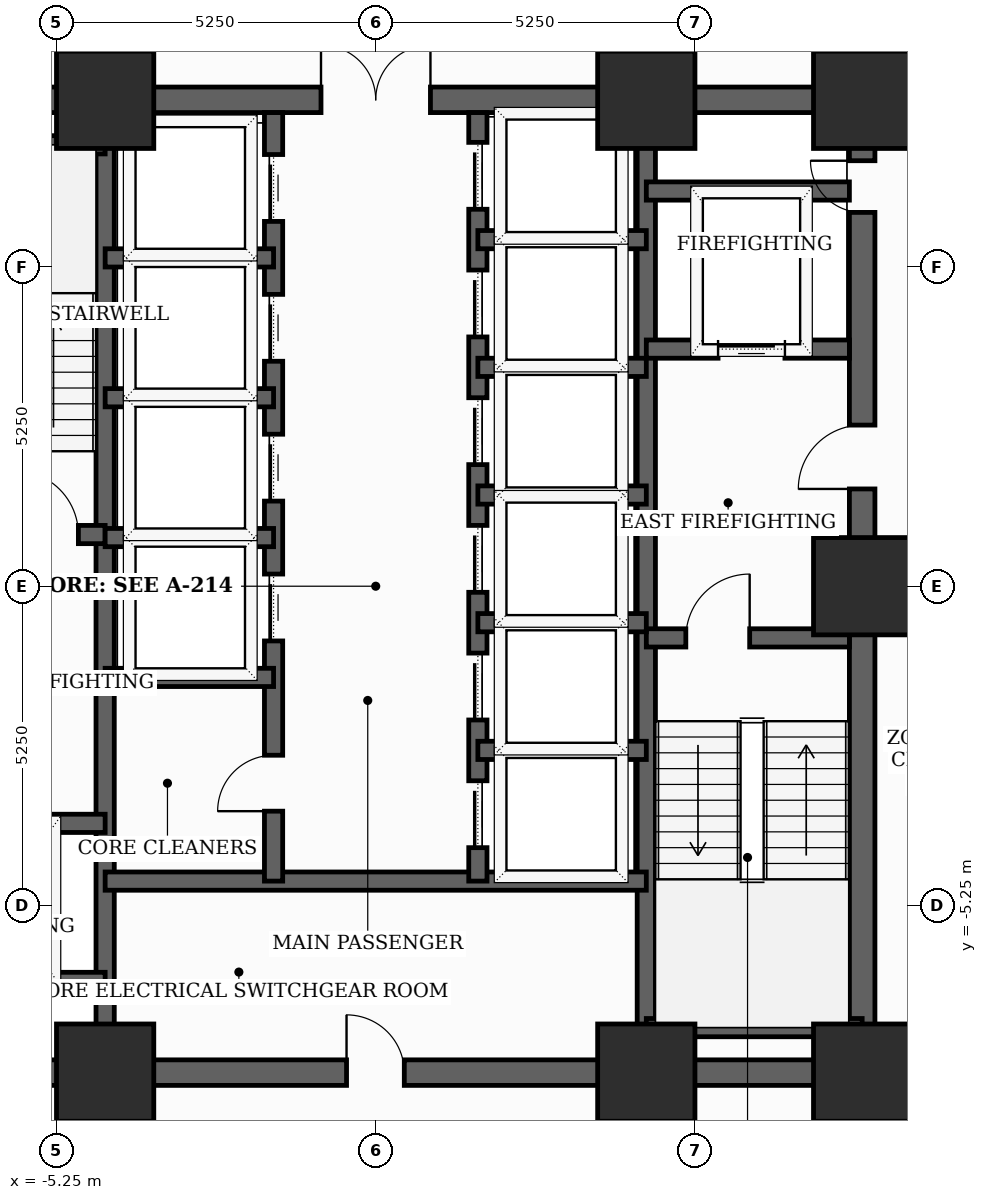
"""IFC4 building model, lengths in metres.
Left out: names, types, materials, properties, quantities, classifications, styles, units other than length and angle.
Written with IfcOpenShell. Run it as: python <this file> out.ifc"""

import sys

from ifc_helpers import new_model, si_unit, direction, frame, frame_2d, origin, origin_2d, place, context, subcontext, project, spatial, rectangle, extrude, element, fill, save


model = new_model("IFC4")
c1 = context("Model", 3, precision=1e-05, world=origin(), true_north=direction((0.0, 1.0)))
c2 = subcontext(c1, "Body", "Model", "MODEL_VIEW")
j1 = project(units=[si_unit("LENGTHUNIT", "METRE"), si_unit("PLANEANGLEUNIT", "RADIAN")], contexts=[c1])
p1 = place(None, origin())
s1 = spatial("IfcSite", under=j1, at=p1, CompositionType="ELEMENT")
p2 = place(p1, origin())
s2 = spatial("IfcBuilding", under=s1, at=p2, CompositionType="ELEMENT")
p3 = place(p2, frame((0.0, 0.0, 59.3)))
s3 = spatial("IfcBuildingStorey", under=s2, at=p3, CompositionType="ELEMENT", Elevation=59.3)
for number, where, z_axis, x_axis in (
    (1, (-4.45, -8.0, 0.0), (0.0, 0.0, 1.0), (1.0, 0.0, 0.0)),
    (2, (4.45, -8.0, 0.0), (0.0, 0.0, 1.0), (1.0, 0.0, 0.0)),
    (3, (8.0, -8.0, 0.0), (0.0, 0.0, 1.0), (1.0, 0.0, 0.0)),
    (4, (8.0, 0.0, 0.0), (0.0, 0.0, 1.0), (1.0, 0.0, 0.0)),
    (5, (8.0, 8.0, 0.0), (0.0, 0.0, 1.0), (1.0, 0.0, 0.0)),
    (6, (4.45, 8.0, 0.0), (0.0, 0.0, 1.0), (1.0, 0.0, 0.0)),
    (7, (-4.45, 8.0, 0.0), (0.0, 0.0, 1.0), (1.0, 0.0, 0.0)),
):
    element("IfcColumn", number, at=place(p3, frame(where, z_axis=z_axis, x_axis=x_axis)), inside=s3, PredefinedType="COLUMN", context=c2, shape_type="SweptSolid", body=[
        extrude(rectangle(XDim=1.6, YDim=1.6, at=origin_2d()), origin(), (0.0, 0.0, 1.0), 3.7),
    ])
p4 = place(p3, frame((8.0, -8.0, 0.0), z_axis=(0.0, 0.0, 1.0), x_axis=(0.0, 1.0, 0.0)))
e8 = element("IfcWall", 8, at=p4, inside=s3, PredefinedType="SHEAR", context=c2, shape_type="SweptSolid", body=[
    extrude(rectangle(XDim=16.0, YDim=0.42, at=frame_2d((8.0, 0.0))), origin(), (0.0, 0.0, 1.0), 3.5),
])
p5 = place(p4, frame((9.6, 0.0, 0.0)))
e9 = element("IfcOpeningElement", 9, at=p5, cuts=e8, PredefinedType="OPENING", context=c2, shape_type="SweptSolid", body=[
    extrude(rectangle(XDim=1.05, YDim=2.15, at=frame_2d((0.525, 1.075))), frame((0.0, 0.22, 0.0), z_axis=(0.0, -1.0, 0.0), x_axis=(1.0, 0.0, 0.0)), (0.0, 0.0, 1.0), 0.44),
])
p6 = place(p4, frame((14.148, 0.0, 0.0)))
e10 = element("IfcOpeningElement", 10, at=p6, cuts=e8, PredefinedType="OPENING", context=c2, shape_type="SweptSolid", body=[
    extrude(rectangle(XDim=0.85, YDim=2.02, at=frame_2d((0.425, 1.01))), frame((0.0, 0.22, 0.0), z_axis=(0.0, -1.0, 0.0), x_axis=(1.0, 0.0, 0.0)), (0.0, 0.0, 1.0), 0.44),
])
p7 = place(p3, frame((-8.0, -8.0, 0.0), z_axis=(0.0, 0.0, 1.0), x_axis=(1.0, 0.0, 0.0)))
e11 = element("IfcWall", 11, at=p7, inside=s3, PredefinedType="SHEAR", context=c2, shape_type="SweptSolid", body=[
    extrude(rectangle(XDim=16.0, YDim=0.42, at=frame_2d((8.0, 0.0))), origin(), (0.0, 0.0, 1.0), 3.5),
])
p8 = place(p7, frame((7.52, 0.0, 0.0)))
e12 = element("IfcOpeningElement", 12, at=p8, cuts=e11, PredefinedType="OPENING", context=c2, shape_type="SweptSolid", body=[
    extrude(rectangle(XDim=0.95, YDim=2.1, at=frame_2d((0.475, 1.05))), frame((0.0, 0.22, 0.0), z_axis=(0.0, -1.0, 0.0), x_axis=(1.0, 0.0, 0.0)), (0.0, 0.0, 1.0), 0.44),
])
p9 = place(p3, frame((-8.0, 8.0, 0.0), z_axis=(0.0, 0.0, 1.0), x_axis=(1.0, 0.0, 0.0)))
e13 = element("IfcWall", 13, at=p9, inside=s3, PredefinedType="SHEAR", context=c2, shape_type="SweptSolid", body=[
    extrude(rectangle(XDim=16.0, YDim=0.42, at=frame_2d((8.0, 0.0))), origin(), (0.0, 0.0, 1.0), 3.5),
])
p10 = place(p9, frame((7.1, 0.0, 0.0)))
e14 = element("IfcOpeningElement", 14, at=p10, cuts=e13, PredefinedType="OPENING", context=c2, shape_type="SweptSolid", body=[
    extrude(rectangle(XDim=1.8, YDim=2.15, at=frame_2d((0.9, 1.075))), frame((0.0, 0.22, 0.0), z_axis=(0.0, -1.0, 0.0), x_axis=(1.0, 0.0, 0.0)), (0.0, 0.0, 1.0), 0.44),
])
for number, where, z_axis, x_axis in (
    (15, (-4.45, -7.79, 0.0), (0.0, 0.0, 1.0), (0.0, 1.0, 0.0)),
    (16, (4.45, -7.79, 0.0), (0.0, 0.0, 1.0), (0.0, 1.0, 0.0)),
):
    element("IfcWall", number, at=place(p3, frame(where, z_axis=z_axis, x_axis=x_axis)), inside=s3, PredefinedType="SHEAR", context=c2, shape_type="SweptSolid", body=[
        extrude(rectangle(XDim=15.58, YDim=0.3, at=frame_2d((7.79, 0.0))), origin(), (0.0, 0.0, 1.0), 3.5),
    ])
p11 = place(p3, frame((-7.79, 0.85, 0.0), z_axis=(0.0, 0.0, 1.0), x_axis=(1.0, 0.0, 0.0)))
e17 = element("IfcWall", 17, at=p11, inside=s3, PredefinedType="SHEAR", context=c2, shape_type="SweptSolid", body=[
    extrude(rectangle(XDim=3.34, YDim=0.3, at=frame_2d((1.67, 0.0))), origin(), (0.0, 0.0, 1.0), 3.5),
])
p12 = place(p11, frame((1.85, 0.0, 0.0)))
e18 = element("IfcOpeningElement", 18, at=p12, cuts=e17, PredefinedType="OPENING", context=c2, shape_type="SweptSolid", body=[
    extrude(rectangle(XDim=1.05, YDim=2.15, at=frame_2d((0.525, 1.075))), frame((0.0, 0.16, 0.0), z_axis=(0.0, -1.0, 0.0), x_axis=(1.0, 0.0, 0.0)), (0.0, 0.0, 1.0), 0.32),
])
p13 = place(p3, frame((-7.79, 7.26, 0.0), z_axis=(0.0, 0.0, 1.0), x_axis=(1.0, 0.0, 0.0)))
e19 = element("IfcWall", 19, at=p13, inside=s3, PredefinedType="SHEAR", context=c2, shape_type="SweptSolid", body=[
    extrude(rectangle(XDim=3.34, YDim=0.3, at=frame_2d((1.67, 0.0))), origin(), (0.0, 0.0, 1.0), 3.5),
])
p14 = place(p3, frame((4.45, -0.85, 0.0), z_axis=(0.0, 0.0, 1.0), x_axis=(1.0, 0.0, 0.0)))
e20 = element("IfcWall", 20, at=p14, inside=s3, PredefinedType="SHEAR", context=c2, shape_type="SweptSolid", body=[
    extrude(rectangle(XDim=3.34, YDim=0.3, at=frame_2d((1.67, 0.0))), origin(), (0.0, 0.0, 1.0), 3.5),
])
p15 = place(p14, frame((0.65, 0.0, 0.0)))
e21 = element("IfcOpeningElement", 21, at=p15, cuts=e20, PredefinedType="OPENING", context=c2, shape_type="SweptSolid", body=[
    extrude(rectangle(XDim=1.05, YDim=2.15, at=frame_2d((0.525, 1.075))), frame((0.0, 0.16, 0.0), z_axis=(0.0, -1.0, 0.0), x_axis=(1.0, 0.0, 0.0)), (0.0, 0.0, 1.0), 0.32),
])
p16 = place(p3, frame((4.45, -7.26, 0.0), z_axis=(0.0, 0.0, 1.0), x_axis=(1.0, 0.0, 0.0)))
e22 = element("IfcWall", 22, at=p16, inside=s3, PredefinedType="SHEAR", context=c2, shape_type="SweptSolid", body=[
    extrude(rectangle(XDim=3.55, YDim=0.3, at=frame_2d((1.775, 0.0))), origin(), (0.0, 0.0, 1.0), 3.5),
])
p17 = place(p3, frame((-7.79, -3.9, 0.0), z_axis=(0.0, 0.0, 1.0), x_axis=(1.0, 0.0, 0.0)))
e23 = element("IfcWall", 23, at=p17, inside=s3, PredefinedType="SHEAR", context=c2, shape_type="SweptSolid", body=[
    extrude(rectangle(XDim=3.34, YDim=0.3, at=frame_2d((1.67, 0.0))), origin(), (0.0, 0.0, 1.0), 3.5),
])
p18 = place(p17, frame((1.27, 0.0, 0.0)))
e24 = element("IfcOpeningElement", 24, at=p18, cuts=e23, PredefinedType="OPENING", context=c2, shape_type="SweptSolid", body=[
    extrude(rectangle(XDim=1.1, YDim=2.1, at=frame_2d((0.55, 1.05))), frame((0.0, 0.16, 0.0), z_axis=(0.0, -1.0, 0.0), x_axis=(1.0, 0.0, 0.0)), (0.0, 0.0, 1.0), 0.32),
])
p19 = place(p3, frame((-7.79, -6.5, 0.0), z_axis=(0.0, 0.0, 1.0), x_axis=(1.0, 0.0, 0.0)))
e25 = element("IfcWall", 25, at=p19, inside=s3, PredefinedType="SHEAR", context=c2, shape_type="SweptSolid", body=[
    extrude(rectangle(XDim=3.34, YDim=0.3, at=frame_2d((1.67, 0.0))), origin(), (0.0, 0.0, 1.0), 3.5),
])
p20 = place(p3, frame((4.45, 3.9, 0.0), z_axis=(0.0, 0.0, 1.0), x_axis=(1.0, 0.0, 0.0)))
e26 = element("IfcWall", 26, at=p20, inside=s3, PredefinedType="SHEAR", context=c2, shape_type="SweptSolid", body=[
    extrude(rectangle(XDim=3.34, YDim=0.3, at=frame_2d((1.67, 0.0))), origin(), (0.0, 0.0, 1.0), 3.5),
])
p21 = place(p20, frame((1.18, 0.0, 0.0)))
e27 = element("IfcOpeningElement", 27, at=p21, cuts=e26, PredefinedType="OPENING", context=c2, shape_type="SweptSolid", body=[
    extrude(rectangle(XDim=1.1, YDim=2.1, at=frame_2d((0.55, 1.05))), frame((0.0, 0.16, 0.0), z_axis=(0.0, -1.0, 0.0), x_axis=(1.0, 0.0, 0.0)), (0.0, 0.0, 1.0), 0.32),
])
p22 = place(p3, frame((4.45, 6.5, 0.0), z_axis=(0.0, 0.0, 1.0), x_axis=(1.0, 0.0, 0.0)))
e28 = element("IfcWall", 28, at=p22, inside=s3, PredefinedType="SHEAR", context=c2, shape_type="SweptSolid", body=[
    extrude(rectangle(XDim=3.34, YDim=0.3, at=frame_2d((1.67, 0.0))), origin(), (0.0, 0.0, 1.0), 3.5),
])
p23 = place(p3, frame((-4.45, -4.85, 0.0), z_axis=(0.0, 0.0, 1.0), x_axis=(1.0, 0.0, 0.0)))
e29 = element("IfcWall", 29, at=p23, inside=s3, PredefinedType="SHEAR", context=c2, shape_type="SweptSolid", body=[
    extrude(rectangle(XDim=8.9, YDim=0.3, at=frame_2d((4.45, 0.0))), origin(), (0.0, 0.0, 1.0), 3.5),
])
p24 = place(p3, frame((-1.68, -4.85, 0.0), z_axis=(0.0, 0.0, 1.0), x_axis=(0.0, 1.0, 0.0)))
e30 = element("IfcWall", 30, at=p24, inside=s3, PredefinedType="SHEAR", context=c2, shape_type="SweptSolid", body=[
    extrude(rectangle(XDim=12.64, YDim=0.3, at=frame_2d((6.32, 0.0))), origin(), (0.0, 0.0, 1.0), 3.5),
])
p25 = place(p24, frame((3.95, 0.0, 0.0)))
e31 = element("IfcOpeningElement", 31, at=p25, cuts=e30, PredefinedType="OPENING", context=c2, shape_type="SweptSolid", body=[
    extrude(rectangle(XDim=1.1, YDim=2.1, at=frame_2d((0.55, 1.05))), frame((0.0, 0.16, 0.0), z_axis=(0.0, -1.0, 0.0), x_axis=(1.0, 0.0, 0.0)), (0.0, 0.0, 1.0), 0.32),
])
p26 = place(p24, frame((6.25, 0.0, 0.0)))
e32 = element("IfcOpeningElement", 32, at=p26, cuts=e30, PredefinedType="OPENING", context=c2, shape_type="SweptSolid", body=[
    extrude(rectangle(XDim=1.1, YDim=2.1, at=frame_2d((0.55, 1.05))), frame((0.0, 0.16, 0.0), z_axis=(0.0, -1.0, 0.0), x_axis=(1.0, 0.0, 0.0)), (0.0, 0.0, 1.0), 0.32),
])
p27 = place(p24, frame((8.55, 0.0, 0.0)))
e33 = element("IfcOpeningElement", 33, at=p27, cuts=e30, PredefinedType="OPENING", context=c2, shape_type="SweptSolid", body=[
    extrude(rectangle(XDim=1.1, YDim=2.1, at=frame_2d((0.55, 1.05))), frame((0.0, 0.16, 0.0), z_axis=(0.0, -1.0, 0.0), x_axis=(1.0, 0.0, 0.0)), (0.0, 0.0, 1.0), 0.32),
])
p28 = place(p24, frame((10.85, 0.0, 0.0)))
e34 = element("IfcOpeningElement", 34, at=p28, cuts=e30, PredefinedType="OPENING", context=c2, shape_type="SweptSolid", body=[
    extrude(rectangle(XDim=1.1, YDim=2.1, at=frame_2d((0.55, 1.05))), frame((0.0, 0.16, 0.0), z_axis=(0.0, -1.0, 0.0), x_axis=(1.0, 0.0, 0.0)), (0.0, 0.0, 1.0), 0.32),
])
p29 = place(p24, frame((1.15, 0.0, 0.0)))
e35 = element("IfcOpeningElement", 35, at=p29, cuts=e30, PredefinedType="OPENING", context=c2, shape_type="SweptSolid", body=[
    extrude(rectangle(XDim=0.92, YDim=2.1, at=frame_2d((0.46, 1.05))), frame((0.0, 0.16, 0.0), z_axis=(0.0, -1.0, 0.0), x_axis=(1.0, 0.0, 0.0)), (0.0, 0.0, 1.0), 0.32),
])
p30 = place(p3, frame((1.68, -4.85, 0.0), z_axis=(0.0, 0.0, 1.0), x_axis=(0.0, 1.0, 0.0)))
e36 = element("IfcWall", 36, at=p30, inside=s3, PredefinedType="SHEAR", context=c2, shape_type="SweptSolid", body=[
    extrude(rectangle(XDim=12.64, YDim=0.3, at=frame_2d((6.32, 0.0))), origin(), (0.0, 0.0, 1.0), 3.5),
])
p31 = place(p30, frame((0.55, 0.0, 0.0)))
e37 = element("IfcOpeningElement", 37, at=p31, cuts=e36, PredefinedType="OPENING", context=c2, shape_type="SweptSolid", body=[
    extrude(rectangle(XDim=1.1, YDim=2.1, at=frame_2d((0.55, 1.05))), frame((0.0, 0.16, 0.0), z_axis=(0.0, -1.0, 0.0), x_axis=(1.0, 0.0, 0.0)), (0.0, 0.0, 1.0), 0.32),
])
p32 = place(p30, frame((2.65, 0.0, 0.0)))
e38 = element("IfcOpeningElement", 38, at=p32, cuts=e36, PredefinedType="OPENING", context=c2, shape_type="SweptSolid", body=[
    extrude(rectangle(XDim=1.1, YDim=2.1, at=frame_2d((0.55, 1.05))), frame((0.0, 0.16, 0.0), z_axis=(0.0, -1.0, 0.0), x_axis=(1.0, 0.0, 0.0)), (0.0, 0.0, 1.0), 0.32),
])
p33 = place(p30, frame((4.75, 0.0, 0.0)))
e39 = element("IfcOpeningElement", 39, at=p33, cuts=e36, PredefinedType="OPENING", context=c2, shape_type="SweptSolid", body=[
    extrude(rectangle(XDim=1.1, YDim=2.1, at=frame_2d((0.55, 1.05))), frame((0.0, 0.16, 0.0), z_axis=(0.0, -1.0, 0.0), x_axis=(1.0, 0.0, 0.0)), (0.0, 0.0, 1.0), 0.32),
])
p34 = place(p30, frame((6.85, 0.0, 0.0)))
e40 = element("IfcOpeningElement", 40, at=p34, cuts=e36, PredefinedType="OPENING", context=c2, shape_type="SweptSolid", body=[
    extrude(rectangle(XDim=1.1, YDim=2.1, at=frame_2d((0.55, 1.05))), frame((0.0, 0.16, 0.0), z_axis=(0.0, -1.0, 0.0), x_axis=(1.0, 0.0, 0.0)), (0.0, 0.0, 1.0), 0.32),
])
p35 = place(p30, frame((8.95, 0.0, 0.0)))
e41 = element("IfcOpeningElement", 41, at=p35, cuts=e36, PredefinedType="OPENING", context=c2, shape_type="SweptSolid", body=[
    extrude(rectangle(XDim=1.1, YDim=2.1, at=frame_2d((0.55, 1.05))), frame((0.0, 0.16, 0.0), z_axis=(0.0, -1.0, 0.0), x_axis=(1.0, 0.0, 0.0)), (0.0, 0.0, 1.0), 0.32),
])
p36 = place(p30, frame((11.05, 0.0, 0.0)))
e42 = element("IfcOpeningElement", 42, at=p36, cuts=e36, PredefinedType="OPENING", context=c2, shape_type="SweptSolid", body=[
    extrude(rectangle(XDim=1.1, YDim=2.1, at=frame_2d((0.55, 1.05))), frame((0.0, 0.16, 0.0), z_axis=(0.0, -1.0, 0.0), x_axis=(1.0, 0.0, 0.0)), (0.0, 0.0, 1.0), 0.32),
])
for number, where, z_axis, x_axis in (
    (43, (-4.45, -1.5, 0.0), (0.0, 0.0, 1.0), (1.0, 0.0, 0.0)),
    (44, (-4.45, 0.8, 0.0), (0.0, 0.0, 1.0), (1.0, 0.0, 0.0)),
    (45, (-4.45, 3.1, 0.0), (0.0, 0.0, 1.0), (1.0, 0.0, 0.0)),
    (46, (-4.45, 5.4, 0.0), (0.0, 0.0, 1.0), (1.0, 0.0, 0.0)),
    (47, (1.68, 1.5, 0.0), (0.0, 0.0, 1.0), (1.0, 0.0, 0.0)),
    (48, (1.68, 3.6, 0.0), (0.0, 0.0, 1.0), (1.0, 0.0, 0.0)),
    (49, (1.68, 5.7, 0.0), (0.0, 0.0, 1.0), (1.0, 0.0, 0.0)),
    (50, (1.68, -2.7, 0.0), (0.0, 0.0, 1.0), (1.0, 0.0, 0.0)),
    (51, (1.68, -0.6, 0.0), (0.0, 0.0, 1.0), (1.0, 0.0, 0.0)),
):
    element("IfcWall", number, at=place(p3, frame(where, z_axis=z_axis, x_axis=x_axis)), inside=s3, PredefinedType="SHEAR", context=c2, shape_type="SweptSolid", body=[
        extrude(rectangle(XDim=2.77, YDim=0.3, at=frame_2d((1.385, 0.0))), origin(), (0.0, 0.0, 1.0), 3.5),
    ])
p37 = place(p5, origin())
e52 = element("IfcDoor", 52, at=p37, inside=s3, OperationType="SINGLE_SWING_LEFT", PredefinedType="DOOR", context=c2, shape_type="SweptSolid", body=[
    extrude(rectangle(XDim=1.05, YDim=2.15, at=frame_2d((0.525, 1.075))), frame((0.0, 0.025, 0.0), z_axis=(0.0, -1.0, 0.0), x_axis=(1.0, 0.0, 0.0)), (0.0, 0.0, 1.0), 0.05),
])
fill(e9, e52)
p38 = place(p6, origin())
e53 = element("IfcDoor", 53, at=p38, inside=s3, OperationType="SINGLE_SWING_RIGHT", PredefinedType="TRAPDOOR", context=c2, shape_type="SweptSolid", body=[
    extrude(rectangle(XDim=0.85, YDim=2.02, at=frame_2d((0.425, 1.01))), frame((0.0, 0.025, 0.0), z_axis=(0.0, -1.0, 0.0), x_axis=(1.0, 0.0, 0.0)), (0.0, 0.0, 1.0), 0.05),
])
fill(e10, e53)
p39 = place(p8, origin())
e54 = element("IfcDoor", 54, at=p39, inside=s3, OperationType="SINGLE_SWING_LEFT", PredefinedType="DOOR", context=c2, shape_type="SweptSolid", body=[
    extrude(rectangle(XDim=0.95, YDim=2.1, at=frame_2d((0.475, 1.05))), frame((0.0, 0.025, 0.0), z_axis=(0.0, -1.0, 0.0), x_axis=(1.0, 0.0, 0.0)), (0.0, 0.0, 1.0), 0.05),
])
fill(e12, e54)
p40 = place(p10, origin())
e55 = element("IfcDoor", 55, at=p40, inside=s3, OperationType="DOUBLE_DOOR_SINGLE_SWING", PredefinedType="DOOR", context=c2, shape_type="SweptSolid", body=[
    extrude(rectangle(XDim=1.8, YDim=2.15, at=frame_2d((0.9, 1.075))), frame((0.0, 0.025, 0.0), z_axis=(0.0, -1.0, 0.0), x_axis=(1.0, 0.0, 0.0)), (0.0, 0.0, 1.0), 0.05),
])
fill(e14, e55)
p41 = place(p12, origin())
e56 = element("IfcDoor", 56, at=p41, inside=s3, OperationType="SINGLE_SWING_LEFT", PredefinedType="DOOR", context=c2, shape_type="SweptSolid", body=[
    extrude(rectangle(XDim=1.05, YDim=2.15, at=frame_2d((0.525, 1.075))), frame((0.0, 0.025, 0.0), z_axis=(0.0, -1.0, 0.0), x_axis=(1.0, 0.0, 0.0)), (0.0, 0.0, 1.0), 0.05),
])
fill(e18, e56)
p42 = place(p15, origin())
e57 = element("IfcDoor", 57, at=p42, inside=s3, OperationType="SINGLE_SWING_RIGHT", PredefinedType="DOOR", context=c2, shape_type="SweptSolid", body=[
    extrude(rectangle(XDim=1.05, YDim=2.15, at=frame_2d((0.525, 1.075))), frame((0.0, 0.025, 0.0), z_axis=(0.0, -1.0, 0.0), x_axis=(1.0, 0.0, 0.0)), (0.0, 0.0, 1.0), 0.05),
])
fill(e21, e57)
p43 = place(p21, origin())
e58 = element("IfcDoor", 58, at=p43, inside=s3, OperationType="SLIDING_TO_LEFT", PredefinedType="DOOR", context=c2, shape_type="SweptSolid", body=[
    extrude(rectangle(XDim=1.1, YDim=2.1, at=frame_2d((0.55, 1.05))), frame((0.0, 0.025, 0.0), z_axis=(0.0, -1.0, 0.0), x_axis=(1.0, 0.0, 0.0)), (0.0, 0.0, 1.0), 0.05),
])
fill(e27, e58)
p44 = place(p25, origin())
e59 = element("IfcDoor", 59, at=p44, inside=s3, OperationType="SLIDING_TO_LEFT", PredefinedType="DOOR", context=c2, shape_type="SweptSolid", body=[
    extrude(rectangle(XDim=1.1, YDim=2.1, at=frame_2d((0.55, 1.05))), frame((0.0, 0.025, 0.0), z_axis=(0.0, -1.0, 0.0), x_axis=(1.0, 0.0, 0.0)), (0.0, 0.0, 1.0), 0.05),
])
fill(e31, e59)
p45 = place(p26, origin())
e60 = element("IfcDoor", 60, at=p45, inside=s3, OperationType="SLIDING_TO_LEFT", PredefinedType="DOOR", context=c2, shape_type="SweptSolid", body=[
    extrude(rectangle(XDim=1.1, YDim=2.1, at=frame_2d((0.55, 1.05))), frame((0.0, 0.025, 0.0), z_axis=(0.0, -1.0, 0.0), x_axis=(1.0, 0.0, 0.0)), (0.0, 0.0, 1.0), 0.05),
])
fill(e32, e60)
p46 = place(p27, origin())
e61 = element("IfcDoor", 61, at=p46, inside=s3, OperationType="SLIDING_TO_LEFT", PredefinedType="DOOR", context=c2, shape_type="SweptSolid", body=[
    extrude(rectangle(XDim=1.1, YDim=2.1, at=frame_2d((0.55, 1.05))), frame((0.0, 0.025, 0.0), z_axis=(0.0, -1.0, 0.0), x_axis=(1.0, 0.0, 0.0)), (0.0, 0.0, 1.0), 0.05),
])
fill(e33, e61)
p47 = place(p28, origin())
e62 = element("IfcDoor", 62, at=p47, inside=s3, OperationType="SLIDING_TO_LEFT", PredefinedType="DOOR", context=c2, shape_type="SweptSolid", body=[
    extrude(rectangle(XDim=1.1, YDim=2.1, at=frame_2d((0.55, 1.05))), frame((0.0, 0.025, 0.0), z_axis=(0.0, -1.0, 0.0), x_axis=(1.0, 0.0, 0.0)), (0.0, 0.0, 1.0), 0.05),
])
fill(e34, e62)
p48 = place(p29, origin())
e63 = element("IfcDoor", 63, at=p48, inside=s3, OperationType="SINGLE_SWING_LEFT", PredefinedType="DOOR", context=c2, shape_type="SweptSolid", body=[
    extrude(rectangle(XDim=0.92, YDim=2.1, at=frame_2d((0.46, 1.05))), frame((0.0, 0.025, 0.0), z_axis=(0.0, -1.0, 0.0), x_axis=(1.0, 0.0, 0.0)), (0.0, 0.0, 1.0), 0.05),
])
fill(e35, e63)
p49 = place(p31, origin())
e64 = element("IfcDoor", 64, at=p49, inside=s3, OperationType="SLIDING_TO_LEFT", PredefinedType="DOOR", context=c2, shape_type="SweptSolid", body=[
    extrude(rectangle(XDim=1.1, YDim=2.1, at=frame_2d((0.55, 1.05))), frame((0.0, 0.025, 0.0), z_axis=(0.0, -1.0, 0.0), x_axis=(1.0, 0.0, 0.0)), (0.0, 0.0, 1.0), 0.05),
])
fill(e37, e64)
p50 = place(p32, origin())
e65 = element("IfcDoor", 65, at=p50, inside=s3, OperationType="SLIDING_TO_LEFT", PredefinedType="DOOR", context=c2, shape_type="SweptSolid", body=[
    extrude(rectangle(XDim=1.1, YDim=2.1, at=frame_2d((0.55, 1.05))), frame((0.0, 0.025, 0.0), z_axis=(0.0, -1.0, 0.0), x_axis=(1.0, 0.0, 0.0)), (0.0, 0.0, 1.0), 0.05),
])
fill(e38, e65)
p51 = place(p33, origin())
e66 = element("IfcDoor", 66, at=p51, inside=s3, OperationType="SLIDING_TO_LEFT", PredefinedType="DOOR", context=c2, shape_type="SweptSolid", body=[
    extrude(rectangle(XDim=1.1, YDim=2.1, at=frame_2d((0.55, 1.05))), frame((0.0, 0.025, 0.0), z_axis=(0.0, -1.0, 0.0), x_axis=(1.0, 0.0, 0.0)), (0.0, 0.0, 1.0), 0.05),
])
fill(e39, e66)
p52 = place(p34, origin())
e67 = element("IfcDoor", 67, at=p52, inside=s3, OperationType="SLIDING_TO_LEFT", PredefinedType="DOOR", context=c2, shape_type="SweptSolid", body=[
    extrude(rectangle(XDim=1.1, YDim=2.1, at=frame_2d((0.55, 1.05))), frame((0.0, 0.025, 0.0), z_axis=(0.0, -1.0, 0.0), x_axis=(1.0, 0.0, 0.0)), (0.0, 0.0, 1.0), 0.05),
])
fill(e40, e67)
p53 = place(p35, origin())
e68 = element("IfcDoor", 68, at=p53, inside=s3, OperationType="SLIDING_TO_LEFT", PredefinedType="DOOR", context=c2, shape_type="SweptSolid", body=[
    extrude(rectangle(XDim=1.1, YDim=2.1, at=frame_2d((0.55, 1.05))), frame((0.0, 0.025, 0.0), z_axis=(0.0, -1.0, 0.0), x_axis=(1.0, 0.0, 0.0)), (0.0, 0.0, 1.0), 0.05),
])
fill(e41, e68)
p54 = place(p36, origin())
e69 = element("IfcDoor", 69, at=p54, inside=s3, OperationType="SLIDING_TO_LEFT", PredefinedType="DOOR", context=c2, shape_type="SweptSolid", body=[
    extrude(rectangle(XDim=1.1, YDim=2.1, at=frame_2d((0.55, 1.05))), frame((0.0, 0.025, 0.0), z_axis=(0.0, -1.0, 0.0), x_axis=(1.0, 0.0, 0.0)), (0.0, 0.0, 1.0), 0.05),
])
fill(e42, e69)
save(model, sys.argv[1])
